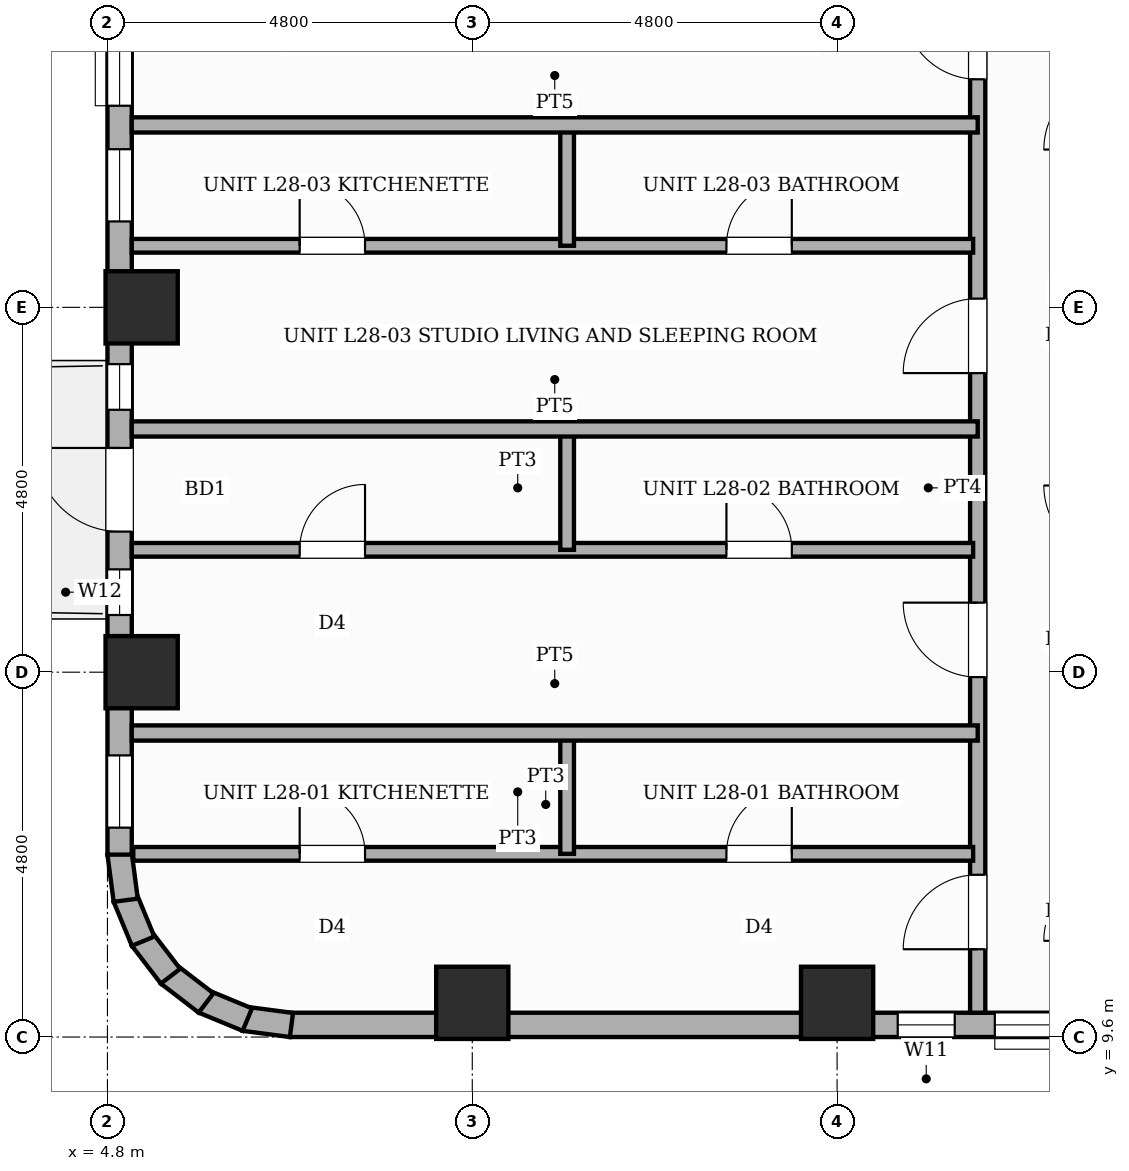
"""IFC4 building model, lengths in metres.
Left out: names, types, materials, properties, quantities, classifications, styles, units other than length and angle.
Written with IfcOpenShell. Run it as: python <this file> out.ifc"""

import sys

from ifc_helpers import new_model, si_unit, direction, frame, frame_2d, origin, origin_2d, place, context, subcontext, project, spatial, rectangle, extrude, element, fill, save


model = new_model("IFC4")
c1 = context("Model", 3, precision=1e-05, world=origin(), true_north=direction((0.0, 1.0)))
c2 = subcontext(c1, "Body", "Model", "MODEL_VIEW")
j1 = project(units=[si_unit("LENGTHUNIT", "METRE"), si_unit("PLANEANGLEUNIT", "RADIAN")], contexts=[c1])
p1 = place(None, origin())
s1 = spatial("IfcSite", under=j1, at=p1, CompositionType="ELEMENT")
p2 = place(p1, origin())
s2 = spatial("IfcBuilding", under=s1, at=p2, CompositionType="ELEMENT")
p3 = place(p2, frame((0.0, 0.0, 110.8)))
s3 = spatial("IfcBuildingStorey", under=s2, at=p3, CompositionType="ELEMENT", Elevation=110.8)
for number, where, z_axis, x_axis in (
    (1, (5.25, 14.4, 0.0), (0.0, 0.0, 1.0), (1.0, 0.0, 0.0)),
    (2, (5.25, 19.2, 0.0), (0.0, 0.0, 1.0), (1.0, 0.0, 0.0)),
    (3, (9.6, 10.05, 0.0), (0.0, 0.0, 1.0), (1.0, 0.0, 0.0)),
    (4, (14.4, 10.05, 0.0), (0.0, 0.0, 1.0), (1.0, 0.0, 0.0)),
):
    element("IfcColumn", number, at=place(p3, frame(where, z_axis=z_axis, x_axis=x_axis)), inside=s3, PredefinedType="COLUMN", context=c2, shape_type="SweptSolid", body=[
        extrude(rectangle(XDim=0.95, YDim=0.95, at=origin_2d()), origin(), (0.0, 0.0, 1.0), 3.6),
    ])
p4 = place(p3, frame((21.6, 9.76, 0.0), z_axis=(0.0, 0.0, 1.0), x_axis=(-1.0, 0.0, 0.0)))
e5 = element("IfcWall", 5, at=p4, inside=s3, PredefinedType="STANDARD", context=c2, shape_type="SweptSolid", body=[
    extrude(rectangle(XDim=14.4, YDim=0.32, at=frame_2d((7.2, 0.0))), origin(), (0.0, 0.0, 1.0), 2.54),
])
p5 = place(p4, frame((5.653, 0.0, 0.45)))
e6 = element("IfcOpeningElement", 6, at=p5, cuts=e5, PredefinedType="OPENING", context=c2, shape_type="SweptSolid", body=[
    extrude(rectangle(XDim=0.75, YDim=1.8, at=frame_2d((0.375, 0.9))), frame((0.0, 0.17, 0.0), z_axis=(0.0, -1.0, 0.0), x_axis=(1.0, 0.0, 0.0)), (0.0, 0.0, 1.0), 0.34),
])
p6 = place(p4, frame((0.282, 0.0, 0.65)))
e7 = element("IfcOpeningElement", 7, at=p6, cuts=e5, PredefinedType="OPENING", context=c2, shape_type="SweptSolid", body=[
    extrude(rectangle(XDim=1.4, YDim=1.1, at=frame_2d((0.7, 0.55))), frame((0.0, 0.17, 0.0), z_axis=(0.0, -1.0, 0.0), x_axis=(1.0, 0.0, 0.0)), (0.0, 0.0, 1.0), 0.34),
])
p7 = place(p4, frame((3.725, 0.0, 0.65)))
e8 = element("IfcOpeningElement", 8, at=p7, cuts=e5, PredefinedType="OPENING", context=c2, shape_type="SweptSolid", body=[
    extrude(rectangle(XDim=1.4, YDim=1.1, at=frame_2d((0.7, 0.55))), frame((0.0, 0.17, 0.0), z_axis=(0.0, -1.0, 0.0), x_axis=(1.0, 0.0, 0.0)), (0.0, 0.0, 1.0), 0.34),
])
p8 = place(p3, frame((7.221, 9.759, 0.0), z_axis=(0.0, 0.0, 1.0), x_axis=(-0.991447664465, 0.130504898859, 0.0)))
e9 = element("IfcWall", 9, at=p8, inside=s3, PredefinedType="STANDARD", context=c2, shape_type="SweptSolid", body=[
    extrude(rectangle(XDim=0.627, YDim=0.32, at=frame_2d((0.313, 0.0))), origin(), (0.0, 0.0, 1.0), 3.36),
])
p9 = place(p3, frame((6.64, 9.83, 0.0), z_axis=(0.0, 0.0, 1.0), x_axis=(-0.923836271867, 0.382787856107, 0.0)))
e10 = element("IfcWall", 10, at=p9, inside=s3, PredefinedType="STANDARD", context=c2, shape_type="SweptSolid", body=[
    extrude(rectangle(XDim=0.626, YDim=0.32, at=frame_2d((0.313, 0.0))), origin(), (0.0, 0.0, 1.0), 3.36),
])
p10 = place(p3, frame((6.097, 10.048, 0.0), z_axis=(0.0, 0.0, 1.0), x_axis=(-0.793405610854, 0.608693302629, 0.0)))
e11 = element("IfcWall", 11, at=p10, inside=s3, PredefinedType="STANDARD", context=c2, shape_type="SweptSolid", body=[
    extrude(rectangle(XDim=0.626, YDim=0.32, at=frame_2d((0.313, 0.0))), origin(), (0.0, 0.0, 1.0), 3.36),
])
p11 = place(p3, frame((5.63, 10.4, 0.0), z_axis=(0.0, 0.0, 1.0), x_axis=(-0.608938521285, 0.7932174212, 0.0)))
e12 = element("IfcWall", 12, at=p11, inside=s3, PredefinedType="STANDARD", context=c2, shape_type="SweptSolid", body=[
    extrude(rectangle(XDim=0.627, YDim=0.32, at=frame_2d((0.313, 0.0))), origin(), (0.0, 0.0, 1.0), 3.36),
])
p12 = place(p3, frame((5.269, 10.861, 0.0), z_axis=(0.0, 0.0, 1.0), x_axis=(-0.382650053678, 0.92389335771, 0.0)))
e13 = element("IfcWall", 13, at=p12, inside=s3, PredefinedType="STANDARD", context=c2, shape_type="SweptSolid", body=[
    extrude(rectangle(XDim=0.626, YDim=0.32, at=frame_2d((0.313, 0.0))), origin(), (0.0, 0.0, 1.0), 3.36),
])
p13 = place(p3, frame((5.04, 11.4, 0.0), z_axis=(0.0, 0.0, 1.0), x_axis=(-0.130504898859, 0.991447664465, 0.0)))
e14 = element("IfcWall", 14, at=p13, inside=s3, PredefinedType="STANDARD", context=c2, shape_type="SweptSolid", body=[
    extrude(rectangle(XDim=0.627, YDim=0.32, at=frame_2d((0.313, 0.0))), origin(), (0.0, 0.0, 1.0), 3.36),
])
p14 = place(p3, frame((4.96, 12.0, 0.0), z_axis=(0.0, 0.0, 1.0), x_axis=(0.0, 1.0, 0.0)))
e15 = element("IfcWall", 15, at=p14, inside=s3, PredefinedType="STANDARD", context=c2, shape_type="SweptSolid", body=[
    extrude(rectangle(XDim=33.6, YDim=0.32, at=frame_2d((16.8, 0.0))), origin(), (0.0, 0.0, 1.0), 2.54),
])
p15 = place(p14, frame((4.25, 0.0, 0.0)))
e16 = element("IfcOpeningElement", 16, at=p15, cuts=e15, PredefinedType="OPENING", context=c2, shape_type="SweptSolid", body=[
    extrude(rectangle(XDim=1.1, YDim=2.15, at=frame_2d((0.55, 1.075))), frame((0.0, 0.17, 0.0), z_axis=(0.0, -1.0, 0.0), x_axis=(1.0, 0.0, 0.0)), (0.0, 0.0, 1.0), 0.34),
])
p16 = place(p14, frame((3.153, 0.0, 0.45)))
e17 = element("IfcOpeningElement", 17, at=p16, cuts=e15, PredefinedType="OPENING", context=c2, shape_type="SweptSolid", body=[
    extrude(rectangle(XDim=0.6, YDim=1.8, at=frame_2d((0.3, 0.9))), frame((0.0, 0.17, 0.0), z_axis=(0.0, -1.0, 0.0), x_axis=(1.0, 0.0, 0.0)), (0.0, 0.0, 1.0), 0.34),
])
p17 = place(p14, frame((5.853, 0.0, 0.45)))
e18 = element("IfcOpeningElement", 18, at=p17, cuts=e15, PredefinedType="OPENING", context=c2, shape_type="SweptSolid", body=[
    extrude(rectangle(XDim=0.6, YDim=1.8, at=frame_2d((0.3, 0.9))), frame((0.0, 0.17, 0.0), z_axis=(0.0, -1.0, 0.0), x_axis=(1.0, 0.0, 0.0)), (0.0, 0.0, 1.0), 0.34),
])
p18 = place(p14, frame((9.853, 0.0, 0.65)))
e19 = element("IfcOpeningElement", 19, at=p18, cuts=e15, PredefinedType="OPENING", context=c2, shape_type="SweptSolid", body=[
    extrude(rectangle(XDim=1.4, YDim=1.1, at=frame_2d((0.7, 0.55))), frame((0.0, 0.17, 0.0), z_axis=(0.0, -1.0, 0.0), x_axis=(1.0, 0.0, 0.0)), (0.0, 0.0, 1.0), 0.34),
])
p19 = place(p14, frame((0.355, 0.0, 0.45)))
e20 = element("IfcOpeningElement", 20, at=p19, cuts=e15, PredefinedType="OPENING", context=c2, shape_type="SweptSolid", body=[
    extrude(rectangle(XDim=0.95, YDim=1.8, at=frame_2d((0.475, 0.9))), frame((0.0, 0.17, 0.0), z_axis=(0.0, -1.0, 0.0), x_axis=(1.0, 0.0, 0.0)), (0.0, 0.0, 1.0), 0.34),
])
p20 = place(p14, frame((8.33, 0.0, 0.45)))
e21 = element("IfcOpeningElement", 21, at=p20, cuts=e15, PredefinedType="OPENING", context=c2, shape_type="SweptSolid", body=[
    extrude(rectangle(XDim=0.95, YDim=1.8, at=frame_2d((0.475, 0.9))), frame((0.0, 0.17, 0.0), z_axis=(0.0, -1.0, 0.0), x_axis=(1.0, 0.0, 0.0)), (0.0, 0.0, 1.0), 0.34),
])
p21 = place(p14, frame((12.732, 0.0, 0.45)))
e22 = element("IfcOpeningElement", 22, at=p21, cuts=e15, PredefinedType="OPENING", context=c2, shape_type="SweptSolid", body=[
    extrude(rectangle(XDim=0.75, YDim=1.8, at=frame_2d((0.375, 0.9))), frame((0.0, 0.17, 0.0), z_axis=(0.0, -1.0, 0.0), x_axis=(1.0, 0.0, 0.0)), (0.0, 0.0, 1.0), 0.34),
])
p22 = place(p14, frame((14.558, 0.0, 0.65)))
e23 = element("IfcOpeningElement", 23, at=p22, cuts=e15, PredefinedType="OPENING", context=c2, shape_type="SweptSolid", body=[
    extrude(rectangle(XDim=1.4, YDim=1.1, at=frame_2d((0.7, 0.55))), frame((0.0, 0.17, 0.0), z_axis=(0.0, -1.0, 0.0), x_axis=(1.0, 0.0, 0.0)), (0.0, 0.0, 1.0), 0.34),
])
p23 = place(p3, frame((16.25, 9.92, 0.0), z_axis=(0.0, 0.0, 1.0), x_axis=(0.0, 1.0, 0.0)))
e24 = element("IfcWall", 24, at=p23, inside=s3, PredefinedType="PARTITIONING", context=c2, shape_type="SweptSolid", body=[
    extrude(rectangle(XDim=15.83, YDim=0.2, at=frame_2d((7.915, 0.0))), origin(), (0.0, 0.0, 1.0), 3.36),
])
p24 = place(p23, frame((0.835, 0.0, 0.0)))
e25 = element("IfcOpeningElement", 25, at=p24, cuts=e24, PredefinedType="OPENING", context=c2, shape_type="SweptSolid", body=[
    extrude(rectangle(XDim=0.98, YDim=2.18, at=frame_2d((0.49, 1.09))), frame((0.0, 0.11, 0.0), z_axis=(0.0, -1.0, 0.0), x_axis=(1.0, 0.0, 0.0)), (0.0, 0.0, 1.0), 0.22),
])
p25 = place(p23, frame((4.415, 0.0, 0.0)))
e26 = element("IfcOpeningElement", 26, at=p25, cuts=e24, PredefinedType="OPENING", context=c2, shape_type="SweptSolid", body=[
    extrude(rectangle(XDim=0.98, YDim=2.18, at=frame_2d((0.49, 1.09))), frame((0.0, 0.11, 0.0), z_axis=(0.0, -1.0, 0.0), x_axis=(1.0, 0.0, 0.0)), (0.0, 0.0, 1.0), 0.22),
])
p26 = place(p23, frame((8.415, 0.0, 0.0)))
e27 = element("IfcOpeningElement", 27, at=p26, cuts=e24, PredefinedType="OPENING", context=c2, shape_type="SweptSolid", body=[
    extrude(rectangle(XDim=0.98, YDim=2.18, at=frame_2d((0.49, 1.09))), frame((0.0, 0.11, 0.0), z_axis=(0.0, -1.0, 0.0), x_axis=(1.0, 0.0, 0.0)), (0.0, 0.0, 1.0), 0.22),
])
p27 = place(p23, frame((12.28, 0.0, 0.0)))
e28 = element("IfcOpeningElement", 28, at=p27, cuts=e24, PredefinedType="OPENING", context=c2, shape_type="SweptSolid", body=[
    extrude(rectangle(XDim=0.98, YDim=2.18, at=frame_2d((0.49, 1.09))), frame((0.0, 0.11, 0.0), z_axis=(0.0, -1.0, 0.0), x_axis=(1.0, 0.0, 0.0)), (0.0, 0.0, 1.0), 0.22),
])
p28 = place(p3, frame((5.14, 12.01, 0.0), z_axis=(0.0, 0.0, 1.0), x_axis=(1.0, 0.0, 0.0)))
e29 = element("IfcWall", 29, at=p28, inside=s3, PredefinedType="PLUMBINGWALL", context=c2, shape_type="SweptSolid", body=[
    extrude(rectangle(XDim=11.05, YDim=0.18, at=frame_2d((5.525, 0.0))), origin(), (0.0, 0.0, 1.0), 3.36),
])
p29 = place(p28, frame((2.189, 0.0, 0.0)))
e30 = element("IfcOpeningElement", 30, at=p29, cuts=e29, PredefinedType="OPENING", context=c2, shape_type="SweptSolid", body=[
    extrude(rectangle(XDim=0.86, YDim=2.1, at=frame_2d((0.43, 1.05))), frame((0.0, 0.1, 0.0), z_axis=(0.0, -1.0, 0.0), x_axis=(1.0, 0.0, 0.0)), (0.0, 0.0, 1.0), 0.2),
])
p30 = place(p28, frame((7.804, 0.0, 0.0)))
e31 = element("IfcOpeningElement", 31, at=p30, cuts=e29, PredefinedType="OPENING", context=c2, shape_type="SweptSolid", body=[
    extrude(rectangle(XDim=0.86, YDim=2.1, at=frame_2d((0.43, 1.05))), frame((0.0, 0.1, 0.0), z_axis=(0.0, -1.0, 0.0), x_axis=(1.0, 0.0, 0.0)), (0.0, 0.0, 1.0), 0.2),
])
p31 = place(p3, frame((10.848, 12.01, 0.0), z_axis=(0.0, 0.0, 1.0), x_axis=(0.0, 1.0, 0.0)))
e32 = element("IfcWall", 32, at=p31, inside=s3, PredefinedType="PLUMBINGWALL", context=c2, shape_type="SweptSolid", body=[
    extrude(rectangle(XDim=1.63, YDim=0.18, at=frame_2d((0.815, 0.0))), origin(), (0.0, 0.0, 1.0), 3.36),
])
p32 = place(p3, frame((5.12, 13.6, 0.0), z_axis=(0.0, 0.0, 1.0), x_axis=(1.0, 0.0, 0.0)))
e33 = element("IfcWall", 33, at=p32, inside=s3, PredefinedType="SOLIDWALL", context=c2, shape_type="SweptSolid", body=[
    extrude(rectangle(XDim=11.13, YDim=0.2, at=frame_2d((5.565, 0.0))), origin(), (0.0, 0.0, 1.0), 3.36),
])
p33 = place(p3, frame((5.12, 16.01, 0.0), z_axis=(0.0, 0.0, 1.0), x_axis=(1.0, 0.0, 0.0)))
e34 = element("IfcWall", 34, at=p33, inside=s3, PredefinedType="PLUMBINGWALL", context=c2, shape_type="SweptSolid", body=[
    extrude(rectangle(XDim=11.07, YDim=0.18, at=frame_2d((5.535, 0.0))), origin(), (0.0, 0.0, 1.0), 3.36),
])
p34 = place(p33, frame((2.209, 0.0, 0.0)))
e35 = element("IfcOpeningElement", 35, at=p34, cuts=e34, PredefinedType="OPENING", context=c2, shape_type="SweptSolid", body=[
    extrude(rectangle(XDim=0.86, YDim=2.1, at=frame_2d((0.43, 1.05))), frame((0.0, 0.1, 0.0), z_axis=(0.0, -1.0, 0.0), x_axis=(1.0, 0.0, 0.0)), (0.0, 0.0, 1.0), 0.2),
])
p35 = place(p33, frame((7.824, 0.0, 0.0)))
e36 = element("IfcOpeningElement", 36, at=p35, cuts=e34, PredefinedType="OPENING", context=c2, shape_type="SweptSolid", body=[
    extrude(rectangle(XDim=0.86, YDim=2.1, at=frame_2d((0.43, 1.05))), frame((0.0, 0.1, 0.0), z_axis=(0.0, -1.0, 0.0), x_axis=(1.0, 0.0, 0.0)), (0.0, 0.0, 1.0), 0.2),
])
p36 = place(p3, frame((10.848, 16.01, 0.0), z_axis=(0.0, 0.0, 1.0), x_axis=(0.0, 1.0, 0.0)))
e37 = element("IfcWall", 37, at=p36, inside=s3, PredefinedType="PLUMBINGWALL", context=c2, shape_type="SweptSolid", body=[
    extrude(rectangle(XDim=1.63, YDim=0.18, at=frame_2d((0.815, 0.0))), origin(), (0.0, 0.0, 1.0), 3.36),
])
p37 = place(p3, frame((5.12, 17.6, 0.0), z_axis=(0.0, 0.0, 1.0), x_axis=(1.0, 0.0, 0.0)))
e38 = element("IfcWall", 38, at=p37, inside=s3, PredefinedType="SOLIDWALL", context=c2, shape_type="SweptSolid", body=[
    extrude(rectangle(XDim=11.13, YDim=0.2, at=frame_2d((5.565, 0.0))), origin(), (0.0, 0.0, 1.0), 3.36),
])
p38 = place(p3, frame((5.12, 20.01, 0.0), z_axis=(0.0, 0.0, 1.0), x_axis=(1.0, 0.0, 0.0)))
e39 = element("IfcWall", 39, at=p38, inside=s3, PredefinedType="PLUMBINGWALL", context=c2, shape_type="SweptSolid", body=[
    extrude(rectangle(XDim=11.07, YDim=0.18, at=frame_2d((5.535, 0.0))), origin(), (0.0, 0.0, 1.0), 3.36),
])
p39 = place(p38, frame((2.209, 0.0, 0.0)))
e40 = element("IfcOpeningElement", 40, at=p39, cuts=e39, PredefinedType="OPENING", context=c2, shape_type="SweptSolid", body=[
    extrude(rectangle(XDim=0.86, YDim=2.1, at=frame_2d((0.43, 1.05))), frame((0.0, 0.1, 0.0), z_axis=(0.0, -1.0, 0.0), x_axis=(1.0, 0.0, 0.0)), (0.0, 0.0, 1.0), 0.2),
])
p40 = place(p38, frame((7.824, 0.0, 0.0)))
e41 = element("IfcOpeningElement", 41, at=p40, cuts=e39, PredefinedType="OPENING", context=c2, shape_type="SweptSolid", body=[
    extrude(rectangle(XDim=0.86, YDim=2.1, at=frame_2d((0.43, 1.05))), frame((0.0, 0.1, 0.0), z_axis=(0.0, -1.0, 0.0), x_axis=(1.0, 0.0, 0.0)), (0.0, 0.0, 1.0), 0.2),
])
p41 = place(p3, frame((10.848, 20.01, 0.0), z_axis=(0.0, 0.0, 1.0), x_axis=(0.0, 1.0, 0.0)))
e42 = element("IfcWall", 42, at=p41, inside=s3, PredefinedType="PLUMBINGWALL", context=c2, shape_type="SweptSolid", body=[
    extrude(rectangle(XDim=1.63, YDim=0.18, at=frame_2d((0.815, 0.0))), origin(), (0.0, 0.0, 1.0), 3.36),
])
p42 = place(p3, frame((5.12, 21.6, 0.0), z_axis=(0.0, 0.0, 1.0), x_axis=(1.0, 0.0, 0.0)))
e43 = element("IfcWall", 43, at=p42, inside=s3, PredefinedType="SOLIDWALL", context=c2, shape_type="SweptSolid", body=[
    extrude(rectangle(XDim=11.13, YDim=0.2, at=frame_2d((5.565, 0.0))), origin(), (0.0, 0.0, 1.0), 3.36),
])
p43 = place(p5, origin())
e44 = element("IfcWindow", 44, at=p43, inside=s3, PartitioningType="SINGLE_PANEL", PredefinedType="WINDOW", context=c2, shape_type="SweptSolid", body=[
    extrude(rectangle(XDim=0.75, YDim=1.8, at=frame_2d((0.375, 0.9))), frame((0.0, 0.03, 0.0), z_axis=(0.0, -1.0, 0.0), x_axis=(1.0, 0.0, 0.0)), (0.0, 0.0, 1.0), 0.06),
])
fill(e6, e44)
p44 = place(p7, origin())
e45 = element("IfcWindow", 45, at=p44, inside=s3, PartitioningType="SINGLE_PANEL", PredefinedType="WINDOW", context=c2, shape_type="SweptSolid", body=[
    extrude(rectangle(XDim=1.4, YDim=1.1, at=frame_2d((0.7, 0.55))), frame((0.0, 0.03, 0.0), z_axis=(0.0, -1.0, 0.0), x_axis=(1.0, 0.0, 0.0)), (0.0, 0.0, 1.0), 0.06),
])
fill(e8, e45)
p45 = place(p15, origin())
e46 = element("IfcDoor", 46, at=p45, inside=s3, OperationType="SINGLE_SWING_RIGHT", PredefinedType="DOOR", context=c2, shape_type="SweptSolid", body=[
    extrude(rectangle(XDim=1.1, YDim=2.15, at=frame_2d((0.55, 1.075))), frame((0.0, 0.025, 0.0), z_axis=(0.0, -1.0, 0.0), x_axis=(1.0, 0.0, 0.0)), (0.0, 0.0, 1.0), 0.05),
])
fill(e16, e46)
p46 = place(p16, origin())
e47 = element("IfcWindow", 47, at=p46, inside=s3, PartitioningType="SINGLE_PANEL", PredefinedType="WINDOW", context=c2, shape_type="SweptSolid", body=[
    extrude(rectangle(XDim=0.6, YDim=1.8, at=frame_2d((0.3, 0.9))), frame((0.0, 0.03, 0.0), z_axis=(0.0, -1.0, 0.0), x_axis=(1.0, 0.0, 0.0)), (0.0, 0.0, 1.0), 0.06),
])
fill(e17, e47)
p47 = place(p17, origin())
e48 = element("IfcWindow", 48, at=p47, inside=s3, PartitioningType="SINGLE_PANEL", PredefinedType="WINDOW", context=c2, shape_type="SweptSolid", body=[
    extrude(rectangle(XDim=0.6, YDim=1.8, at=frame_2d((0.3, 0.9))), frame((0.0, 0.03, 0.0), z_axis=(0.0, -1.0, 0.0), x_axis=(1.0, 0.0, 0.0)), (0.0, 0.0, 1.0), 0.06),
])
fill(e18, e48)
p48 = place(p18, origin())
e49 = element("IfcWindow", 49, at=p48, inside=s3, PartitioningType="SINGLE_PANEL", PredefinedType="WINDOW", context=c2, shape_type="SweptSolid", body=[
    extrude(rectangle(XDim=1.4, YDim=1.1, at=frame_2d((0.7, 0.55))), frame((0.0, 0.03, 0.0), z_axis=(0.0, -1.0, 0.0), x_axis=(1.0, 0.0, 0.0)), (0.0, 0.0, 1.0), 0.06),
])
fill(e19, e49)
p49 = place(p19, origin())
e50 = element("IfcWindow", 50, at=p49, inside=s3, PartitioningType="SINGLE_PANEL", PredefinedType="WINDOW", context=c2, shape_type="SweptSolid", body=[
    extrude(rectangle(XDim=0.95, YDim=1.8, at=frame_2d((0.475, 0.9))), frame((0.0, 0.03, 0.0), z_axis=(0.0, -1.0, 0.0), x_axis=(1.0, 0.0, 0.0)), (0.0, 0.0, 1.0), 0.06),
])
fill(e20, e50)
p50 = place(p20, origin())
e51 = element("IfcWindow", 51, at=p50, inside=s3, PartitioningType="SINGLE_PANEL", PredefinedType="WINDOW", context=c2, shape_type="SweptSolid", body=[
    extrude(rectangle(XDim=0.95, YDim=1.8, at=frame_2d((0.475, 0.9))), frame((0.0, 0.03, 0.0), z_axis=(0.0, -1.0, 0.0), x_axis=(1.0, 0.0, 0.0)), (0.0, 0.0, 1.0), 0.06),
])
fill(e21, e51)
p51 = place(p24, origin())
e52 = element("IfcDoor", 52, at=p51, inside=s3, OperationType="SINGLE_SWING_LEFT", PredefinedType="DOOR", context=c2, shape_type="SweptSolid", body=[
    extrude(rectangle(XDim=0.98, YDim=2.18, at=frame_2d((0.49, 1.09))), frame((0.0, 0.025, 0.0), z_axis=(0.0, -1.0, 0.0), x_axis=(1.0, 0.0, 0.0)), (0.0, 0.0, 1.0), 0.05),
])
fill(e25, e52)
p52 = place(p29, origin())
e53 = element("IfcDoor", 53, at=p52, inside=s3, OperationType="SINGLE_SWING_LEFT", PredefinedType="DOOR", context=c2, shape_type="SweptSolid", body=[
    extrude(rectangle(XDim=0.86, YDim=2.1, at=frame_2d((0.43, 1.05))), frame((0.0, 0.025, 0.0), z_axis=(0.0, -1.0, 0.0), x_axis=(1.0, 0.0, 0.0)), (0.0, 0.0, 1.0), 0.05),
])
fill(e30, e53)
p53 = place(p30, origin())
e54 = element("IfcDoor", 54, at=p53, inside=s3, OperationType="SINGLE_SWING_RIGHT", PredefinedType="DOOR", context=c2, shape_type="SweptSolid", body=[
    extrude(rectangle(XDim=0.86, YDim=2.1, at=frame_2d((0.43, 1.05))), frame((0.0, 0.025, 0.0), z_axis=(0.0, -1.0, 0.0), x_axis=(1.0, 0.0, 0.0)), (0.0, 0.0, 1.0), 0.05),
])
fill(e31, e54)
p54 = place(p25, origin())
e55 = element("IfcDoor", 55, at=p54, inside=s3, OperationType="SINGLE_SWING_RIGHT", PredefinedType="DOOR", context=c2, shape_type="SweptSolid", body=[
    extrude(rectangle(XDim=0.98, YDim=2.18, at=frame_2d((0.49, 1.09))), frame((0.0, 0.025, 0.0), z_axis=(0.0, -1.0, 0.0), x_axis=(1.0, 0.0, 0.0)), (0.0, 0.0, 1.0), 0.05),
])
fill(e26, e55)
p55 = place(p34, origin())
e56 = element("IfcDoor", 56, at=p55, inside=s3, OperationType="SINGLE_SWING_RIGHT", PredefinedType="DOOR", context=c2, shape_type="SweptSolid", body=[
    extrude(rectangle(XDim=0.86, YDim=2.1, at=frame_2d((0.43, 1.05))), frame((0.0, 0.025, 0.0), z_axis=(0.0, -1.0, 0.0), x_axis=(1.0, 0.0, 0.0)), (0.0, 0.0, 1.0), 0.05),
])
fill(e35, e56)
p56 = place(p35, origin())
e57 = element("IfcDoor", 57, at=p56, inside=s3, OperationType="SINGLE_SWING_LEFT", PredefinedType="DOOR", context=c2, shape_type="SweptSolid", body=[
    extrude(rectangle(XDim=0.86, YDim=2.1, at=frame_2d((0.43, 1.05))), frame((0.0, 0.025, 0.0), z_axis=(0.0, -1.0, 0.0), x_axis=(1.0, 0.0, 0.0)), (0.0, 0.0, 1.0), 0.05),
])
fill(e36, e57)
p57 = place(p26, origin())
e58 = element("IfcDoor", 58, at=p57, inside=s3, OperationType="SINGLE_SWING_LEFT", PredefinedType="DOOR", context=c2, shape_type="SweptSolid", body=[
    extrude(rectangle(XDim=0.98, YDim=2.18, at=frame_2d((0.49, 1.09))), frame((0.0, 0.025, 0.0), z_axis=(0.0, -1.0, 0.0), x_axis=(1.0, 0.0, 0.0)), (0.0, 0.0, 1.0), 0.05),
])
fill(e27, e58)
p58 = place(p39, origin())
e59 = element("IfcDoor", 59, at=p58, inside=s3, OperationType="SINGLE_SWING_LEFT", PredefinedType="DOOR", context=c2, shape_type="SweptSolid", body=[
    extrude(rectangle(XDim=0.86, YDim=2.1, at=frame_2d((0.43, 1.05))), frame((0.0, 0.025, 0.0), z_axis=(0.0, -1.0, 0.0), x_axis=(1.0, 0.0, 0.0)), (0.0, 0.0, 1.0), 0.05),
])
fill(e40, e59)
p59 = place(p40, origin())
e60 = element("IfcDoor", 60, at=p59, inside=s3, OperationType="SINGLE_SWING_RIGHT", PredefinedType="DOOR", context=c2, shape_type="SweptSolid", body=[
    extrude(rectangle(XDim=0.86, YDim=2.1, at=frame_2d((0.43, 1.05))), frame((0.0, 0.025, 0.0), z_axis=(0.0, -1.0, 0.0), x_axis=(1.0, 0.0, 0.0)), (0.0, 0.0, 1.0), 0.05),
])
fill(e41, e60)
p60 = place(p27, origin())
e61 = element("IfcDoor", 61, at=p60, inside=s3, OperationType="SINGLE_SWING_RIGHT", PredefinedType="DOOR", context=c2, shape_type="SweptSolid", body=[
    extrude(rectangle(XDim=0.98, YDim=2.18, at=frame_2d((0.49, 1.09))), frame((0.0, 0.025, 0.0), z_axis=(0.0, -1.0, 0.0), x_axis=(1.0, 0.0, 0.0)), (0.0, 0.0, 1.0), 0.05),
])
fill(e28, e61)
save(model, sys.argv[1])
